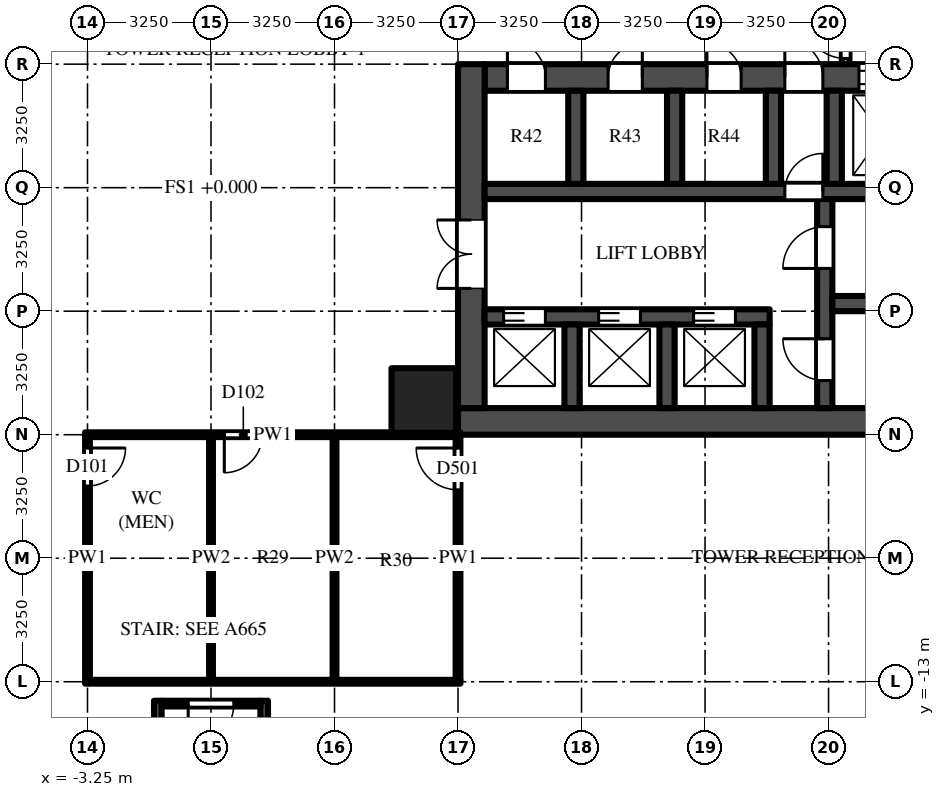
"""IFC4 building model, lengths in metres.
Left out: names, types, materials, properties, quantities, classifications, styles, units other than length and angle.
Written with IfcOpenShell. Run it as: python <this file> out.ifc"""

import sys

from ifc_helpers import new_model, si_unit, direction, frame, frame_2d, origin, origin_2d, place, context, subcontext, project, spatial, rectangle, extrude, source, transform, mapped, element, fill, save


model = new_model("IFC4")
c1 = context("Model", 3, precision=1e-05, world=origin(), true_north=direction((0.0, 1.0)))
c2 = subcontext(c1, "Body", "Model", "MODEL_VIEW")
j1 = project(units=[si_unit("LENGTHUNIT", "METRE"), si_unit("PLANEANGLEUNIT", "RADIAN")], contexts=[c1])
p1 = place(None, origin())
s1 = spatial("IfcSite", under=j1, at=p1, CompositionType="ELEMENT")
p2 = place(p1, origin())
s2 = spatial("IfcBuilding", under=s1, at=p2, CompositionType="ELEMENT")
p3 = place(p2, origin())
s3 = spatial("IfcBuildingStorey", under=s2, at=p3, CompositionType="ELEMENT", Elevation=0.0)
m1 = source(origin(), c2, "Body", "SweptSolid", [
    extrude(rectangle(XDim=1.7, YDim=1.7, at=origin_2d()), origin(), (0.0, 0.0, 1.0), 8.5),
])
p4 = place(p3, frame((5.6, -5.6, -0.5), z_axis=(0.0, 0.0, 1.0), x_axis=(1.0, 0.0, 0.0)))
e1 = element("IfcColumn", 1, at=p4, inside=s3, PredefinedType="COLUMN", context=c2, shape_type="MappedRepresentation", body=[
    mapped(m1, transform((0.0, 0.0, 0.0))),
])
p5 = place(p3, frame((6.5, -6.15, 0.0), z_axis=(0.0, 0.0, 1.0), x_axis=(1.0, 0.0, 0.0)))
e2 = element("IfcWall", 2, at=p5, inside=s3, PredefinedType="SHEAR", context=c2, shape_type="SweptSolid", body=[
    extrude(rectangle(XDim=16.25, YDim=0.7, at=frame_2d((8.125, 0.0))), origin(), (0.0, 0.0, 1.0), 7.7),
])
p6 = place(p3, frame((7.2, 2.9, 0.0), z_axis=(0.0, 0.0, 1.0), x_axis=(1.0, 0.0, 0.0)))
e3 = element("IfcWall", 3, at=p6, inside=s3, PredefinedType="SHEAR", context=c2, shape_type="SweptSolid", body=[
    extrude(rectangle(XDim=14.85, YDim=0.7, at=frame_2d((7.425, 0.0))), origin(), (0.0, 0.0, 1.0), 7.7),
])
m2 = source(origin(), c2, "Body", "SweptSolid", [
    extrude(rectangle(XDim=1.3, YDim=2.1, at=frame_2d((0.65, 1.05))), frame((0.0, 0.36, 0.0), z_axis=(0.0, -1.0, 0.0), x_axis=(1.0, 0.0, 0.0)), (0.0, 0.0, 1.0), 0.72),
])
p7 = place(p6, frame((12.2, 0.0, 0.0)))
e4 = element("IfcOpeningElement", 4, at=p7, cuts=e3, PredefinedType="OPENING", context=c2, shape_type="MappedRepresentation", body=[
    mapped(m2, transform((0.0, 0.0, 0.0))),
])
m3 = source(origin(), c2, "Body", "SweptSolid", [
    extrude(rectangle(XDim=1.2, YDim=2.1, at=frame_2d((0.6, 1.05))), frame((0.0, 0.36, 0.0), z_axis=(0.0, -1.0, 0.0), x_axis=(1.0, 0.0, 0.0)), (0.0, 0.0, 1.0), 0.72),
])
p8 = place(p6, frame((9.85, 0.0, 0.0)))
e5 = element("IfcOpeningElement", 5, at=p8, cuts=e3, PredefinedType="OPENING", context=c2, shape_type="MappedRepresentation", body=[
    mapped(m3, transform((0.0, 0.0, 0.0))),
])
m4 = source(origin(), c2, "Body", "SweptSolid", [
    extrude(rectangle(XDim=1.0, YDim=2.1, at=frame_2d((0.5, 1.05))), frame((0.0, 0.36, 0.0), z_axis=(0.0, -1.0, 0.0), x_axis=(1.0, 0.0, 0.0)), (0.0, 0.0, 1.0), 0.72),
])
p9 = place(p6, frame((7.9, 0.0, 0.0)))
e6 = element("IfcOpeningElement", 6, at=p9, cuts=e3, PredefinedType="OPENING", context=c2, shape_type="MappedRepresentation", body=[
    mapped(m4, transform((0.0, 0.0, 0.0))),
])
p10 = place(p6, frame((0.6, 0.0, 0.0)))
e7 = element("IfcOpeningElement", 7, at=p10, cuts=e3, PredefinedType="OPENING", context=c2, shape_type="MappedRepresentation", body=[
    mapped(m4, transform((0.0, 0.0, 0.0))),
])
m5 = source(origin(), c2, "Body", "SweptSolid", [
    extrude(rectangle(XDim=0.9, YDim=2.1, at=frame_2d((0.45, 1.05))), frame((0.0, 0.36, 0.0), z_axis=(0.0, -1.0, 0.0), x_axis=(1.0, 0.0, 0.0)), (0.0, 0.0, 1.0), 0.72),
])
p11 = place(p6, frame((3.25, 0.0, 0.0)))
e8 = element("IfcOpeningElement", 8, at=p11, cuts=e3, PredefinedType="OPENING", context=c2, shape_type="MappedRepresentation", body=[
    mapped(m5, transform((0.0, 0.0, 0.0))),
])
p12 = place(p6, frame((5.85, 0.0, 0.0)))
e9 = element("IfcOpeningElement", 9, at=p12, cuts=e3, PredefinedType="OPENING", context=c2, shape_type="MappedRepresentation", body=[
    mapped(m5, transform((0.0, 0.0, 0.0))),
])
p13 = place(p3, frame((6.85, -5.8, 0.0), z_axis=(0.0, 0.0, 1.0), x_axis=(0.0, 1.0, 0.0)))
e10 = element("IfcWall", 10, at=p13, inside=s3, PredefinedType="SHEAR", context=c2, shape_type="SweptSolid", body=[
    extrude(rectangle(XDim=9.05, YDim=0.7, at=frame_2d((4.525, 0.0))), origin(), (0.0, 0.0, 1.0), 7.7),
])
m6 = source(origin(), c2, "Body", "SweptSolid", [
    extrude(rectangle(XDim=1.8, YDim=2.1, at=frame_2d((0.9, 1.05))), frame((0.0, 0.36, 0.0), z_axis=(0.0, -1.0, 0.0), x_axis=(1.0, 0.0, 0.0)), (0.0, 0.0, 1.0), 0.72),
])
p14 = place(p13, frame((3.15, 0.0, 0.0)))
e11 = element("IfcOpeningElement", 11, at=p14, cuts=e10, PredefinedType="OPENING", context=c2, shape_type="MappedRepresentation", body=[
    mapped(m6, transform((0.0, 0.0, 0.0))),
])
p15 = place(p3, frame((7.2, -3.4, 0.0), z_axis=(0.0, 0.0, 1.0), x_axis=(1.0, 0.0, 0.0)))
e12 = element("IfcWall", 12, at=p15, inside=s3, PredefinedType="SHEAR", context=c2, shape_type="SweptSolid", body=[
    extrude(rectangle(XDim=7.5, YDim=0.4, at=frame_2d((3.75, 0.0))), origin(), (0.0, 0.0, 1.0), 7.7),
])
m7 = source(origin(), c2, "Body", "SweptSolid", [
    extrude(rectangle(XDim=1.1, YDim=2.1, at=frame_2d((0.55, 1.05))), frame((0.0, 0.21, 0.0), z_axis=(0.0, -1.0, 0.0), x_axis=(1.0, 0.0, 0.0)), (0.0, 0.0, 1.0), 0.42),
])
p16 = place(p15, frame((0.5, 0.0, 0.0)))
e13 = element("IfcOpeningElement", 13, at=p16, cuts=e12, PredefinedType="OPENING", context=c2, shape_type="MappedRepresentation", body=[
    mapped(m7, transform((0.0, 0.0, 0.0))),
])
p17 = place(p15, frame((3.0, 0.0, 0.0)))
e14 = element("IfcOpeningElement", 14, at=p17, cuts=e12, PredefinedType="OPENING", context=c2, shape_type="MappedRepresentation", body=[
    mapped(m7, transform((0.0, 0.0, 0.0))),
])
p18 = place(p15, frame((5.5, 0.0, 0.0)))
e15 = element("IfcOpeningElement", 15, at=p18, cuts=e12, PredefinedType="OPENING", context=c2, shape_type="MappedRepresentation", body=[
    mapped(m7, transform((0.0, 0.0, 0.0))),
])
m8 = source(origin(), c2, "Body", "SweptSolid", [
    extrude(rectangle(XDim=14.85, YDim=0.4, at=frame_2d((7.425, 0.0))), origin(), (0.0, 0.0, 1.0), 7.7),
])
p19 = place(p3, frame((7.2, -0.1, 0.0), z_axis=(0.0, 0.0, 1.0), x_axis=(1.0, 0.0, 0.0)))
e16 = element("IfcWall", 16, at=p19, inside=s3, PredefinedType="SHEAR", context=c2, shape_type="MappedRepresentation", body=[
    mapped(m8, transform((0.0, 0.0, 0.0))),
])
m9 = source(origin(), c2, "Body", "SweptSolid", [
    extrude(rectangle(XDim=1.0, YDim=2.1, at=frame_2d((0.5, 1.05))), frame((0.0, 0.21, 0.0), z_axis=(0.0, -1.0, 0.0), x_axis=(1.0, 0.0, 0.0)), (0.0, 0.0, 1.0), 0.42),
])
p20 = place(p19, frame((7.9, 0.0, 0.0)))
e17 = element("IfcOpeningElement", 17, at=p20, cuts=e16, PredefinedType="OPENING", context=c2, shape_type="MappedRepresentation", body=[
    mapped(m9, transform((0.0, 0.0, 0.0))),
])
m10 = source(origin(), c2, "Body", "SweptSolid", [
    extrude(rectangle(XDim=5.5, YDim=0.4, at=frame_2d((2.75, 0.0))), origin(), (0.0, 0.0, 1.0), 7.7),
])
p21 = place(p3, frame((16.15, -5.8, 0.0), z_axis=(0.0, 0.0, 1.0), x_axis=(0.0, 1.0, 0.0)))
e18 = element("IfcWall", 18, at=p21, inside=s3, PredefinedType="SHEAR", context=c2, shape_type="MappedRepresentation", body=[
    mapped(m10, transform((0.0, 0.0, 0.0))),
])
p22 = place(p21, frame((0.725, 0.0, 0.0)))
e19 = element("IfcOpeningElement", 19, at=p22, cuts=e18, PredefinedType="OPENING", context=c2, shape_type="MappedRepresentation", body=[
    mapped(m7, transform((0.0, 0.0, 0.0))),
])
p23 = place(p21, frame((3.675, 0.0, 0.0)))
e20 = element("IfcOpeningElement", 20, at=p23, cuts=e18, PredefinedType="OPENING", context=c2, shape_type="MappedRepresentation", body=[
    mapped(m7, transform((0.0, 0.0, 0.0))),
])
m11 = source(origin(), c2, "Body", "SweptSolid", [
    extrude(rectangle(XDim=5.7, YDim=0.4, at=frame_2d((2.85, 0.0))), origin(), (0.0, 0.0, 1.0), 7.7),
])
p24 = place(p3, frame((16.35, -3.05, 0.0), z_axis=(0.0, 0.0, 1.0), x_axis=(1.0, 0.0, 0.0)))
e21 = element("IfcWall", 21, at=p24, inside=s3, PredefinedType="SHEAR", context=c2, shape_type="MappedRepresentation", body=[
    mapped(m11, transform((0.0, 0.0, 0.0))),
])
m12 = source(origin(), c2, "Body", "SweptSolid", [
    extrude(rectangle(XDim=2.2, YDim=0.4, at=frame_2d((1.1, 0.0))), origin(), (0.0, 0.0, 1.0), 7.7),
])
for number, where, z_axis, x_axis in (
    (22, (9.5, -5.8, 0.0), (0.0, 0.0, 1.0), (0.0, 1.0, 0.0)),
    (23, (12.0, -5.8, 0.0), (0.0, 0.0, 1.0), (0.0, 1.0, 0.0)),
    (24, (14.5, -5.8, 0.0), (0.0, 0.0, 1.0), (0.0, 1.0, 0.0)),
):
    element("IfcWall", number, at=place(p3, frame(where, z_axis=z_axis, x_axis=x_axis)), inside=s3, PredefinedType="SHEAR", context=c2, shape_type="MappedRepresentation", body=[
        mapped(m12, transform((0.0, 0.0, 0.0))),
    ])
m13 = source(origin(), c2, "Body", "SweptSolid", [
    extrude(rectangle(XDim=2.45, YDim=0.4, at=frame_2d((1.225, 0.0))), origin(), (0.0, 0.0, 1.0), 7.7),
])
for number, where, z_axis, x_axis in (
    (25, (9.6, 0.1, 0.0), (0.0, 0.0, 1.0), (0.0, 1.0, 0.0)),
    (26, (12.2, 0.1, 0.0), (0.0, 0.0, 1.0), (0.0, 1.0, 0.0)),
    (27, (14.8, 0.1, 0.0), (0.0, 0.0, 1.0), (0.0, 1.0, 0.0)),
    (28, (16.4, 0.1, 0.0), (0.0, 0.0, 1.0), (0.0, 1.0, 0.0)),
):
    element("IfcWall", number, at=place(p3, frame(where, z_axis=z_axis, x_axis=x_axis)), inside=s3, PredefinedType="SHEAR", context=c2, shape_type="MappedRepresentation", body=[
        mapped(m13, transform((0.0, 0.0, 0.0))),
    ])
m14 = source(origin(), c2, "Body", "SweptSolid", [
    extrude(rectangle(XDim=3.25, YDim=0.2, at=frame_2d((1.625, 0.0))), origin(), (0.0, 0.0, 1.0), 7.7),
])
p25 = place(p3, frame((16.7, 3.25, 0.0), z_axis=(0.0, 0.0, 1.0), x_axis=(0.0, 1.0, 0.0)))
e29 = element("IfcWall", 29, at=p25, inside=s3, PredefinedType="PARTITIONING", context=c2, shape_type="MappedRepresentation", body=[
    mapped(m14, transform((0.0, 0.0, 0.0))),
])
m15 = source(origin(), c2, "Body", "SweptSolid", [
    extrude(rectangle(XDim=1.1, YDim=2.1, at=frame_2d((0.55, 1.05))), frame((0.0, 0.11, 0.0), z_axis=(0.0, -1.0, 0.0), x_axis=(1.0, 0.0, 0.0)), (0.0, 0.0, 1.0), 0.22),
])
p26 = place(p25, frame((0.15, 0.0, 0.0)))
e30 = element("IfcOpeningElement", 30, at=p26, cuts=e29, PredefinedType="OPENING", context=c2, shape_type="MappedRepresentation", body=[
    mapped(m15, transform((0.0, 0.0, 0.0))),
])
m16 = source(origin(), c2, "Body", "SweptSolid", [
    extrude(rectangle(XDim=6.0, YDim=0.2, at=frame_2d((3.0, 0.0))), origin(), (0.0, 0.0, 1.0), 7.7),
])
for number, where, z_axis, x_axis in (
    (31, (1.4, -13.5, 0.0), (0.0, 0.0, 1.0), (0.0, -1.0, 0.0)),
    (32, (-1.4, -13.5, 0.0), (0.0, 0.0, 1.0), (0.0, -1.0, 0.0)),
):
    element("IfcWall", number, at=place(p3, frame(where, z_axis=z_axis, x_axis=x_axis)), inside=s3, PredefinedType="SHEAR", context=c2, shape_type="MappedRepresentation", body=[
        mapped(m16, transform((0.0, 0.0, 0.0))),
    ])
m17 = source(origin(), c2, "Body", "SweptSolid", [
    extrude(rectangle(XDim=2.6, YDim=0.15, at=frame_2d((1.3, 0.0))), origin(), (0.0, 0.0, 1.0), 7.7),
])
p27 = place(p3, frame((1.3, -13.575, 0.0), z_axis=(0.0, 0.0, 1.0), x_axis=(-1.0, 0.0, 0.0)))
e33 = element("IfcWall", 33, at=p27, inside=s3, PredefinedType="SHEAR", context=c2, shape_type="MappedRepresentation", body=[
    mapped(m17, transform((0.0, 0.0, 0.0))),
])
m18 = source(origin(), c2, "Body", "SweptSolid", [
    extrude(rectangle(XDim=1.2, YDim=2.1, at=frame_2d((0.6, 1.05))), frame((0.0, 0.085, 0.0), z_axis=(0.0, -1.0, 0.0), x_axis=(1.0, 0.0, 0.0)), (0.0, 0.0, 1.0), 0.17),
])
p28 = place(p27, frame((0.7, 0.0, 0.0)))
e34 = element("IfcOpeningElement", 34, at=p28, cuts=e33, PredefinedType="OPENING", context=c2, shape_type="MappedRepresentation", body=[
    mapped(m18, transform((0.0, 0.0, 0.0))),
])
p29 = place(p3, frame((-3.25, -6.562, 0.0), z_axis=(0.0, 0.0, 1.0), x_axis=(0.0, -1.0, 0.0)))
e35 = element("IfcWall", 35, at=p29, inside=s3, PredefinedType="PARTITIONING", context=c2, shape_type="SweptSolid", body=[
    extrude(rectangle(XDim=6.387, YDim=0.125, at=frame_2d((3.194, 0.0))), origin(), (0.0, 0.0, 1.0), 7.7),
])
m19 = source(origin(), c2, "Body", "SweptSolid", [
    extrude(rectangle(XDim=1.0, YDim=2.1, at=frame_2d((0.5, 1.05))), frame((0.0, 0.073, 0.0), z_axis=(0.0, -1.0, 0.0), x_axis=(1.0, 0.0, 0.0)), (0.0, 0.0, 1.0), 0.145),
])
p30 = place(p29, frame((0.288, 0.0, 0.0)))
e36 = element("IfcOpeningElement", 36, at=p30, cuts=e35, PredefinedType="OPENING", context=c2, shape_type="MappedRepresentation", body=[
    mapped(m19, transform((0.0, 0.0, 0.0))),
])
p31 = place(p3, frame((0.0, -12.95, 0.0), z_axis=(0.0, 0.0, 1.0), x_axis=(0.0, 1.0, 0.0)))
e37 = element("IfcWall", 37, at=p31, inside=s3, PredefinedType="PARTITIONING", context=c2, shape_type="SweptSolid", body=[
    extrude(rectangle(XDim=6.387, YDim=0.1, at=frame_2d((3.194, 0.0))), origin(), (0.0, 0.0, 1.0), 7.077),
])
p32 = place(p3, frame((3.25, -12.95, 0.0), z_axis=(0.0, 0.0, 1.0), x_axis=(0.0, 1.0, 0.0)))
e38 = element("IfcWall", 38, at=p32, inside=s3, PredefinedType="PARTITIONING", context=c2, shape_type="SweptSolid", body=[
    extrude(rectangle(XDim=6.387, YDim=0.1, at=frame_2d((3.194, 0.0))), origin(), (0.0, 0.0, 1.0), 7.7),
])
p33 = place(p3, frame((6.5, -12.95, 0.0), z_axis=(0.0, 0.0, 1.0), x_axis=(0.0, 1.0, 0.0)))
e39 = element("IfcWall", 39, at=p33, inside=s3, PredefinedType="PARTITIONING", context=c2, shape_type="SweptSolid", body=[
    extrude(rectangle(XDim=6.387, YDim=0.125, at=frame_2d((3.194, 0.0))), origin(), (0.0, 0.0, 1.0), 6.997),
])
m20 = source(origin(), c2, "Body", "SweptSolid", [
    extrude(rectangle(XDim=1.1, YDim=2.1, at=frame_2d((0.55, 1.05))), frame((0.0, 0.073, 0.0), z_axis=(0.0, -1.0, 0.0), x_axis=(1.0, 0.0, 0.0)), (0.0, 0.0, 1.0), 0.145),
])
p34 = place(p33, frame((5.0, 0.0, 0.0)))
e40 = element("IfcOpeningElement", 40, at=p34, cuts=e39, PredefinedType="OPENING", context=c2, shape_type="MappedRepresentation", body=[
    mapped(m20, transform((0.0, 0.0, 0.0))),
])
p35 = place(p3, frame((-3.312, -13.0, 0.0), z_axis=(0.0, 0.0, 1.0), x_axis=(1.0, 0.0, 0.0)))
e41 = element("IfcWall", 41, at=p35, inside=s3, PredefinedType="PARTITIONING", context=c2, shape_type="SweptSolid", body=[
    extrude(rectangle(XDim=9.875, YDim=0.1, at=frame_2d((4.938, 0.0))), origin(), (0.0, 0.0, 1.0), 6.762),
])
p36 = place(p3, frame((6.562, -6.5, 0.0), z_axis=(0.0, 0.0, 1.0), x_axis=(-1.0, 0.0, 0.0)))
e42 = element("IfcWall", 42, at=p36, inside=s3, PredefinedType="PARTITIONING", context=c2, shape_type="SweptSolid", body=[
    extrude(rectangle(XDim=9.875, YDim=0.125, at=frame_2d((4.938, 0.0))), origin(), (0.0, 0.0, 1.0), 6.762),
])
p37 = place(p36, frame((5.212, 0.0, 0.0)))
e43 = element("IfcOpeningElement", 43, at=p37, cuts=e42, PredefinedType="OPENING", context=c2, shape_type="MappedRepresentation", body=[
    mapped(m19, transform((0.0, 0.0, 0.0))),
])
m21 = source(origin(), c2, "Body", "SweptSolid", [
    extrude(rectangle(XDim=1.1, YDim=2.1, at=frame_2d((0.55, 1.05))), frame((0.0, 0.025, 0.0), z_axis=(0.0, -1.0, 0.0), x_axis=(1.0, 0.0, 0.0)), (0.0, 0.0, 1.0), 0.05),
])
p38 = place(p16, origin())
e44 = element("IfcDoor", 44, at=p38, inside=s3, OperationType="DOUBLE_DOOR_SLIDING", PredefinedType="DOOR", context=c2, shape_type="MappedRepresentation", body=[
    mapped(m21, transform((0.0, 0.0, 0.0))),
])
fill(e13, e44)
p39 = place(p17, origin())
e45 = element("IfcDoor", 45, at=p39, inside=s3, OperationType="DOUBLE_DOOR_SLIDING", PredefinedType="DOOR", context=c2, shape_type="MappedRepresentation", body=[
    mapped(m21, transform((0.0, 0.0, 0.0))),
])
fill(e14, e45)
p40 = place(p18, origin())
e46 = element("IfcDoor", 46, at=p40, inside=s3, OperationType="DOUBLE_DOOR_SLIDING", PredefinedType="DOOR", context=c2, shape_type="MappedRepresentation", body=[
    mapped(m21, transform((0.0, 0.0, 0.0))),
])
fill(e15, e46)
m22 = source(origin(), c2, "Body", "SweptSolid", [
    extrude(rectangle(XDim=1.2, YDim=2.1, at=frame_2d((0.6, 1.05))), frame((0.0, -0.275, 0.0), z_axis=(0.0, -1.0, 0.0), x_axis=(1.0, 0.0, 0.0)), (0.0, 0.0, 1.0), 0.05),
])
p41 = place(p8, origin())
e47 = element("IfcDoor", 47, at=p41, inside=s3, OperationType="DOUBLE_DOOR_SLIDING", PredefinedType="DOOR", context=c2, shape_type="MappedRepresentation", body=[
    mapped(m22, transform((0.0, 0.0, 0.0))),
])
fill(e5, e47)
m23 = source(origin(), c2, "Body", "SweptSolid", [
    extrude(rectangle(XDim=1.8, YDim=2.1, at=frame_2d((0.9, 1.05))), frame((0.0, -0.275, 0.0), z_axis=(0.0, -1.0, 0.0), x_axis=(1.0, 0.0, 0.0)), (0.0, 0.0, 1.0), 0.05),
])
p42 = place(p14, origin())
e48 = element("IfcDoor", 48, at=p42, inside=s3, OperationType="DOUBLE_DOOR_SINGLE_SWING", PredefinedType="DOOR", context=c2, shape_type="MappedRepresentation", body=[
    mapped(m23, transform((0.0, 0.0, 0.0))),
])
fill(e11, e48)
p43 = place(p22, origin())
e49 = element("IfcDoor", 49, at=p43, inside=s3, OperationType="SINGLE_SWING_RIGHT", PredefinedType="DOOR", context=c2, shape_type="MappedRepresentation", body=[
    mapped(m21, transform((0.0, 0.0, 0.0))),
])
fill(e19, e49)
p44 = place(p23, origin())
e50 = element("IfcDoor", 50, at=p44, inside=s3, OperationType="SINGLE_SWING_LEFT", PredefinedType="DOOR", context=c2, shape_type="MappedRepresentation", body=[
    mapped(m21, transform((0.0, 0.0, 0.0))),
])
fill(e20, e50)
m24 = source(origin(), c2, "Body", "SweptSolid", [
    extrude(rectangle(XDim=1.0, YDim=2.1, at=frame_2d((0.5, 1.05))), frame((0.0, 0.025, 0.0), z_axis=(0.0, -1.0, 0.0), x_axis=(1.0, 0.0, 0.0)), (0.0, 0.0, 1.0), 0.05),
])
p45 = place(p20, origin())
e51 = element("IfcDoor", 51, at=p45, inside=s3, OperationType="SINGLE_SWING_RIGHT", PredefinedType="DOOR", context=c2, shape_type="MappedRepresentation", body=[
    mapped(m24, transform((0.0, 0.0, 0.0))),
])
fill(e17, e51)
m25 = source(origin(), c2, "Body", "SweptSolid", [
    extrude(rectangle(XDim=1.0, YDim=2.1, at=frame_2d((0.5, 1.05))), frame((0.0, -0.275, 0.0), z_axis=(0.0, -1.0, 0.0), x_axis=(1.0, 0.0, 0.0)), (0.0, 0.0, 1.0), 0.05),
])
p46 = place(p9, origin())
e52 = element("IfcDoor", 52, at=p46, inside=s3, OperationType="SINGLE_SWING_LEFT", PredefinedType="DOOR", context=c2, shape_type="MappedRepresentation", body=[
    mapped(m25, transform((0.0, 0.0, 0.0))),
])
fill(e6, e52)
p47 = place(p26, origin())
e53 = element("IfcDoor", 53, at=p47, inside=s3, OperationType="SINGLE_SWING_RIGHT", PredefinedType="DOOR", context=c2, shape_type="MappedRepresentation", body=[
    mapped(m21, transform((0.0, 0.0, 0.0))),
])
fill(e30, e53)
p48 = place(p10, origin())
e54 = element("IfcDoor", 54, at=p48, inside=s3, OperationType="SINGLE_SWING_LEFT", PredefinedType="DOOR", context=c2, shape_type="MappedRepresentation", body=[
    mapped(m25, transform((0.0, 0.0, 0.0))),
])
fill(e7, e54)
m26 = source(origin(), c2, "Body", "SweptSolid", [
    extrude(rectangle(XDim=0.9, YDim=2.1, at=frame_2d((0.45, 1.05))), frame((0.0, -0.275, 0.0), z_axis=(0.0, -1.0, 0.0), x_axis=(1.0, 0.0, 0.0)), (0.0, 0.0, 1.0), 0.05),
])
p49 = place(p11, origin())
e55 = element("IfcDoor", 55, at=p49, inside=s3, OperationType="SINGLE_SWING_RIGHT", PredefinedType="DOOR", context=c2, shape_type="MappedRepresentation", body=[
    mapped(m26, transform((0.0, 0.0, 0.0))),
])
fill(e8, e55)
p50 = place(p12, origin())
e56 = element("IfcDoor", 56, at=p50, inside=s3, OperationType="SINGLE_SWING_LEFT", PredefinedType="DOOR", context=c2, shape_type="MappedRepresentation", body=[
    mapped(m26, transform((0.0, 0.0, 0.0))),
])
fill(e9, e56)
m27 = source(origin(), c2, "Body", "SweptSolid", [
    extrude(rectangle(XDim=1.2, YDim=2.1, at=frame_2d((0.6, 1.05))), frame((0.0, 0.025, 0.0), z_axis=(0.0, -1.0, 0.0), x_axis=(1.0, 0.0, 0.0)), (0.0, 0.0, 1.0), 0.05),
])
p51 = place(p28, origin())
e57 = element("IfcDoor", 57, at=p51, inside=s3, OperationType="SINGLE_SWING_RIGHT", PredefinedType="DOOR", context=c2, shape_type="MappedRepresentation", body=[
    mapped(m27, transform((0.0, 0.0, 0.0))),
])
fill(e34, e57)
p52 = place(p34, origin())
e58 = element("IfcDoor", 58, at=p52, inside=s3, OperationType="SINGLE_SWING_RIGHT", PredefinedType="DOOR", context=c2, shape_type="MappedRepresentation", body=[
    mapped(m21, transform((0.0, 0.0, 0.0))),
])
fill(e40, e58)
p53 = place(p30, origin())
e59 = element("IfcDoor", 59, at=p53, inside=s3, OperationType="SINGLE_SWING_LEFT", PredefinedType="DOOR", context=c2, shape_type="MappedRepresentation", body=[
    mapped(m24, transform((0.0, 0.0, 0.0))),
])
fill(e36, e59)
p54 = place(p37, origin())
e60 = element("IfcDoor", 60, at=p54, inside=s3, OperationType="SINGLE_SWING_RIGHT", PredefinedType="DOOR", context=c2, shape_type="MappedRepresentation", body=[
    mapped(m24, transform((0.0, 0.0, 0.0))),
])
fill(e43, e60)
save(model, sys.argv[1])
